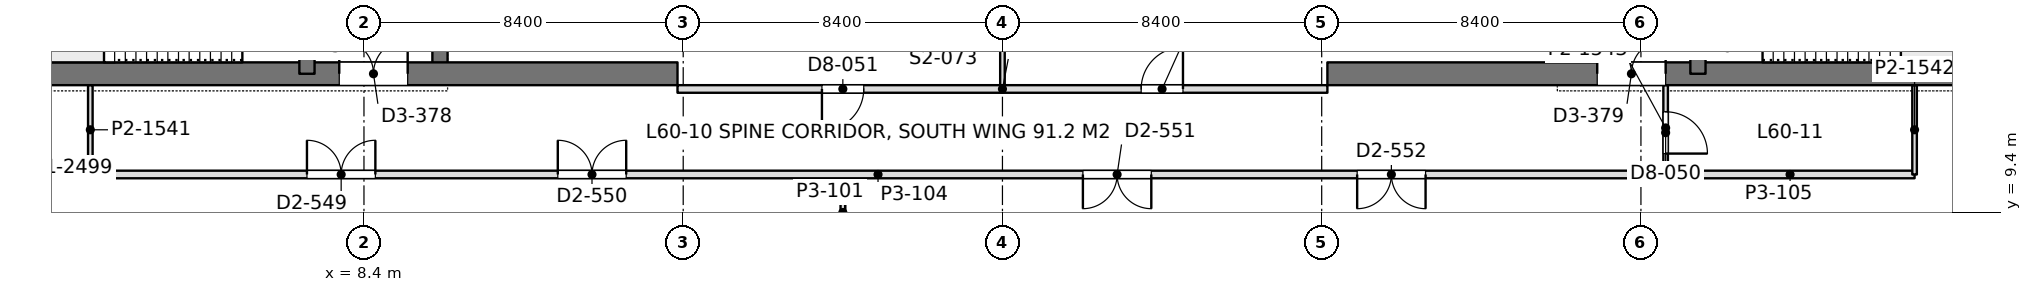
"""IFC4 building model, lengths in metres.
Left out: names, types, materials, properties, quantities, classifications, styles, units other than length and angle.
Written with IfcOpenShell. Run it as: python <this file> out.ifc"""

import sys

from ifc_helpers import new_model, si_unit, direction, frame, frame_2d, origin, place, context, subcontext, project, spatial, rectangle, extrude, element, fill, save


model = new_model("IFC4")
c1 = context("Model", 3, precision=1e-05, world=origin(), true_north=direction((0.0, 1.0)))
c2 = subcontext(c1, "Body", "Model", "MODEL_VIEW")
j1 = project(units=[si_unit("LENGTHUNIT", "METRE"), si_unit("PLANEANGLEUNIT", "RADIAN")], contexts=[c1])
p1 = place(None, origin())
s1 = spatial("IfcSite", under=j1, at=p1, CompositionType="ELEMENT")
p2 = place(p1, origin())
s2 = spatial("IfcBuilding", under=s1, at=p2, CompositionType="ELEMENT")
p3 = place(p2, frame((0.0, 0.0, 263.7)))
s3 = spatial("IfcBuildingStorey", under=s2, at=p3, CompositionType="ELEMENT", Elevation=263.7)
p4 = place(p3, frame((-1.05, 13.05, 0.0), z_axis=(0.0, 0.0, 1.0), x_axis=(1.0, 0.0, 0.0)))
e1 = element("IfcWall", 1, at=p4, inside=s3, PredefinedType="SHEAR", context=c2, shape_type="SweptSolid", body=[
    extrude(rectangle(XDim=17.7, YDim=0.6, at=frame_2d((8.85, 0.0))), origin(), (0.0, 0.0, 1.0), 4.5),
])
p5 = place(p4, frame((8.8, 0.0, 0.0)))
e2 = element("IfcOpeningElement", 2, at=p5, cuts=e1, PredefinedType="OPENING", context=c2, shape_type="SweptSolid", body=[
    extrude(rectangle(XDim=1.8, YDim=2.4, at=frame_2d((0.9, 1.2))), frame((0.0, 0.31, 0.0), z_axis=(0.0, -1.0, 0.0), x_axis=(1.0, 0.0, 0.0)), (0.0, 0.0, 1.0), 0.62),
])
p6 = place(p3, frame((6.9, 13.05, 0.0), z_axis=(0.0, 0.0, 1.0), x_axis=(0.0, 1.0, 0.0)))
e3 = element("IfcWall", 3, at=p6, inside=s3, PredefinedType="SHEAR", context=c2, shape_type="SweptSolid", body=[
    extrude(rectangle(XDim=24.3, YDim=0.4, at=frame_2d((12.15, 0.0))), origin(), (0.0, 0.0, 1.0), 4.5),
])
p7 = place(p6, frame((1.3, 0.0, 0.0)))
e4 = element("IfcOpeningElement", 4, at=p7, cuts=e3, PredefinedType="OPENING", context=c2, shape_type="SweptSolid", body=[
    extrude(rectangle(XDim=1.0, YDim=2.2, at=frame_2d((0.5, 1.1))), frame((0.0, 0.21, 0.0), z_axis=(0.0, -1.0, 0.0), x_axis=(1.0, 0.0, 0.0)), (0.0, 0.0, 1.0), 0.42),
])
p8 = place(p6, frame((22.0, 0.0, 0.0)))
e5 = element("IfcOpeningElement", 5, at=p8, cuts=e3, PredefinedType="OPENING", context=c2, shape_type="SweptSolid", body=[
    extrude(rectangle(XDim=1.0, YDim=2.2, at=frame_2d((0.5, 1.1))), frame((0.0, 0.21, 0.0), z_axis=(0.0, -1.0, 0.0), x_axis=(1.0, 0.0, 0.0)), (0.0, 0.0, 1.0), 0.42),
])
p9 = place(p6, frame((5.55, 0.0, 0.0)))
e6 = element("IfcOpeningElement", 6, at=p9, cuts=e3, PredefinedType="OPENING", context=c2, shape_type="SweptSolid", body=[
    extrude(rectangle(XDim=1.0, YDim=2.2, at=frame_2d((0.5, 1.1))), frame((0.0, 0.21, 0.0), z_axis=(0.0, -1.0, 0.0), x_axis=(1.0, 0.0, 0.0)), (0.0, 0.0, 1.0), 0.42),
])
p10 = place(p6, frame((9.55, 0.0, 0.0)))
e7 = element("IfcOpeningElement", 7, at=p10, cuts=e3, PredefinedType="OPENING", context=c2, shape_type="SweptSolid", body=[
    extrude(rectangle(XDim=1.0, YDim=2.2, at=frame_2d((0.5, 1.1))), frame((0.0, 0.21, 0.0), z_axis=(0.0, -1.0, 0.0), x_axis=(1.0, 0.0, 0.0)), (0.0, 0.0, 1.0), 0.42),
])
p11 = place(p6, frame((12.8, 0.0, 0.0)))
e8 = element("IfcOpeningElement", 8, at=p11, cuts=e3, PredefinedType="OPENING", context=c2, shape_type="SweptSolid", body=[
    extrude(rectangle(XDim=1.1, YDim=2.2, at=frame_2d((0.55, 1.1))), frame((0.0, 0.21, 0.0), z_axis=(0.0, -1.0, 0.0), x_axis=(1.0, 0.0, 0.0)), (0.0, 0.0, 1.0), 0.42),
])
p12 = place(p6, frame((15.538, 0.0, 0.0)))
e9 = element("IfcOpeningElement", 9, at=p12, cuts=e3, PredefinedType="OPENING", context=c2, shape_type="SweptSolid", body=[
    extrude(rectangle(XDim=1.1, YDim=2.2, at=frame_2d((0.55, 1.1))), frame((0.0, 0.21, 0.0), z_axis=(0.0, -1.0, 0.0), x_axis=(1.0, 0.0, 0.0)), (0.0, 0.0, 1.0), 0.42),
])
p13 = place(p6, frame((18.262, 0.0, 0.0)))
e10 = element("IfcOpeningElement", 10, at=p13, cuts=e3, PredefinedType="OPENING", context=c2, shape_type="SweptSolid", body=[
    extrude(rectangle(XDim=1.1, YDim=2.2, at=frame_2d((0.55, 1.1))), frame((0.0, 0.21, 0.0), z_axis=(0.0, -1.0, 0.0), x_axis=(1.0, 0.0, 0.0)), (0.0, 0.0, 1.0), 0.42),
])
p14 = place(p3, frame((10.4, 13.05, 0.0), z_axis=(0.0, 0.0, 1.0), x_axis=(0.0, 1.0, 0.0)))
e11 = element("IfcWall", 11, at=p14, inside=s3, PredefinedType="SHEAR", context=c2, shape_type="SweptSolid", body=[
    extrude(rectangle(XDim=24.3, YDim=0.4, at=frame_2d((12.15, 0.0))), origin(), (0.0, 0.0, 1.0), 4.5),
])
p15 = place(p14, frame((15.75, 0.0, 0.0)))
e12 = element("IfcOpeningElement", 12, at=p15, cuts=e11, PredefinedType="OPENING", context=c2, shape_type="SweptSolid", body=[
    extrude(rectangle(XDim=1.1, YDim=2.2, at=frame_2d((0.55, 1.1))), frame((0.0, 0.21, 0.0), z_axis=(0.0, -1.0, 0.0), x_axis=(1.0, 0.0, 0.0)), (0.0, 0.0, 1.0), 0.42),
])
p16 = place(p14, frame((18.6, 0.0, 0.0)))
e13 = element("IfcOpeningElement", 13, at=p16, cuts=e11, PredefinedType="OPENING", context=c2, shape_type="SweptSolid", body=[
    extrude(rectangle(XDim=1.1, YDim=2.2, at=frame_2d((0.55, 1.1))), frame((0.0, 0.21, 0.0), z_axis=(0.0, -1.0, 0.0), x_axis=(1.0, 0.0, 0.0)), (0.0, 0.0, 1.0), 0.42),
])
p17 = place(p14, frame((21.45, 0.0, 0.0)))
e14 = element("IfcOpeningElement", 14, at=p17, cuts=e11, PredefinedType="OPENING", context=c2, shape_type="SweptSolid", body=[
    extrude(rectangle(XDim=1.1, YDim=2.2, at=frame_2d((0.55, 1.1))), frame((0.0, 0.21, 0.0), z_axis=(0.0, -1.0, 0.0), x_axis=(1.0, 0.0, 0.0)), (0.0, 0.0, 1.0), 0.42),
])
p18 = place(p14, frame((6.05, 0.0, 0.0)))
e15 = element("IfcOpeningElement", 15, at=p18, cuts=e11, PredefinedType="OPENING", context=c2, shape_type="SweptSolid", body=[
    extrude(rectangle(XDim=1.8, YDim=2.4, at=frame_2d((0.9, 1.2))), frame((0.0, 0.21, 0.0), z_axis=(0.0, -1.0, 0.0), x_axis=(1.0, 0.0, 0.0)), (0.0, 0.0, 1.0), 0.42),
])
p19 = place(p14, frame((11.25, 0.0, 0.0)))
e16 = element("IfcOpeningElement", 16, at=p19, cuts=e11, PredefinedType="OPENING", context=c2, shape_type="SweptSolid", body=[
    extrude(rectangle(XDim=1.8, YDim=2.4, at=frame_2d((0.9, 1.2))), frame((0.0, 0.21, 0.0), z_axis=(0.0, -1.0, 0.0), x_axis=(1.0, 0.0, 0.0)), (0.0, 0.0, 1.0), 0.42),
])
p20 = place(p3, frame((33.75, 13.05, 0.0), z_axis=(0.0, 0.0, 1.0), x_axis=(1.0, 0.0, 0.0)))
e17 = element("IfcWall", 17, at=p20, inside=s3, PredefinedType="SHEAR", context=c2, shape_type="SweptSolid", body=[
    extrude(rectangle(XDim=17.7, YDim=0.6, at=frame_2d((8.85, 0.0))), origin(), (0.0, 0.0, 1.0), 4.5),
])
p21 = place(p20, frame((7.1, 0.0, 0.0)))
e18 = element("IfcOpeningElement", 18, at=p21, cuts=e17, PredefinedType="OPENING", context=c2, shape_type="SweptSolid", body=[
    extrude(rectangle(XDim=1.8, YDim=2.4, at=frame_2d((0.9, 1.2))), frame((0.0, 0.31, 0.0), z_axis=(0.0, -1.0, 0.0), x_axis=(1.0, 0.0, 0.0)), (0.0, 0.0, 1.0), 0.62),
])
p22 = place(p3, frame((43.5, 13.05, 0.0), z_axis=(0.0, 0.0, 1.0), x_axis=(0.0, 1.0, 0.0)))
e19 = element("IfcWall", 19, at=p22, inside=s3, PredefinedType="SHEAR", context=c2, shape_type="SweptSolid", body=[
    extrude(rectangle(XDim=24.3, YDim=0.4, at=frame_2d((12.15, 0.0))), origin(), (0.0, 0.0, 1.0), 4.5),
])
p23 = place(p22, frame((1.3, 0.0, 0.0)))
e20 = element("IfcOpeningElement", 20, at=p23, cuts=e19, PredefinedType="OPENING", context=c2, shape_type="SweptSolid", body=[
    extrude(rectangle(XDim=1.0, YDim=2.2, at=frame_2d((0.5, 1.1))), frame((0.0, 0.21, 0.0), z_axis=(0.0, -1.0, 0.0), x_axis=(1.0, 0.0, 0.0)), (0.0, 0.0, 1.0), 0.42),
])
p24 = place(p22, frame((22.0, 0.0, 0.0)))
e21 = element("IfcOpeningElement", 21, at=p24, cuts=e19, PredefinedType="OPENING", context=c2, shape_type="SweptSolid", body=[
    extrude(rectangle(XDim=1.0, YDim=2.2, at=frame_2d((0.5, 1.1))), frame((0.0, 0.21, 0.0), z_axis=(0.0, -1.0, 0.0), x_axis=(1.0, 0.0, 0.0)), (0.0, 0.0, 1.0), 0.42),
])
p25 = place(p22, frame((5.55, 0.0, 0.0)))
e22 = element("IfcOpeningElement", 22, at=p25, cuts=e19, PredefinedType="OPENING", context=c2, shape_type="SweptSolid", body=[
    extrude(rectangle(XDim=1.0, YDim=2.2, at=frame_2d((0.5, 1.1))), frame((0.0, 0.21, 0.0), z_axis=(0.0, -1.0, 0.0), x_axis=(1.0, 0.0, 0.0)), (0.0, 0.0, 1.0), 0.42),
])
p26 = place(p22, frame((9.55, 0.0, 0.0)))
e23 = element("IfcOpeningElement", 23, at=p26, cuts=e19, PredefinedType="OPENING", context=c2, shape_type="SweptSolid", body=[
    extrude(rectangle(XDim=1.0, YDim=2.2, at=frame_2d((0.5, 1.1))), frame((0.0, 0.21, 0.0), z_axis=(0.0, -1.0, 0.0), x_axis=(1.0, 0.0, 0.0)), (0.0, 0.0, 1.0), 0.42),
])
p27 = place(p22, frame((12.8, 0.0, 0.0)))
e24 = element("IfcOpeningElement", 24, at=p27, cuts=e19, PredefinedType="OPENING", context=c2, shape_type="SweptSolid", body=[
    extrude(rectangle(XDim=1.1, YDim=2.2, at=frame_2d((0.55, 1.1))), frame((0.0, 0.21, 0.0), z_axis=(0.0, -1.0, 0.0), x_axis=(1.0, 0.0, 0.0)), (0.0, 0.0, 1.0), 0.42),
])
p28 = place(p22, frame((15.538, 0.0, 0.0)))
e25 = element("IfcOpeningElement", 25, at=p28, cuts=e19, PredefinedType="OPENING", context=c2, shape_type="SweptSolid", body=[
    extrude(rectangle(XDim=1.1, YDim=2.2, at=frame_2d((0.55, 1.1))), frame((0.0, 0.21, 0.0), z_axis=(0.0, -1.0, 0.0), x_axis=(1.0, 0.0, 0.0)), (0.0, 0.0, 1.0), 0.42),
])
p29 = place(p22, frame((18.262, 0.0, 0.0)))
e26 = element("IfcOpeningElement", 26, at=p29, cuts=e19, PredefinedType="OPENING", context=c2, shape_type="SweptSolid", body=[
    extrude(rectangle(XDim=1.1, YDim=2.2, at=frame_2d((0.55, 1.1))), frame((0.0, 0.21, 0.0), z_axis=(0.0, -1.0, 0.0), x_axis=(1.0, 0.0, 0.0)), (0.0, 0.0, 1.0), 0.42),
])
p30 = place(p3, frame((40.0, 13.05, 0.0), z_axis=(0.0, 0.0, 1.0), x_axis=(0.0, 1.0, 0.0)))
e27 = element("IfcWall", 27, at=p30, inside=s3, PredefinedType="SHEAR", context=c2, shape_type="SweptSolid", body=[
    extrude(rectangle(XDim=24.3, YDim=0.4, at=frame_2d((12.15, 0.0))), origin(), (0.0, 0.0, 1.0), 4.5),
])
p31 = place(p30, frame((15.75, 0.0, 0.0)))
e28 = element("IfcOpeningElement", 28, at=p31, cuts=e27, PredefinedType="OPENING", context=c2, shape_type="SweptSolid", body=[
    extrude(rectangle(XDim=1.1, YDim=2.2, at=frame_2d((0.55, 1.1))), frame((0.0, 0.21, 0.0), z_axis=(0.0, -1.0, 0.0), x_axis=(1.0, 0.0, 0.0)), (0.0, 0.0, 1.0), 0.42),
])
p32 = place(p30, frame((18.6, 0.0, 0.0)))
e29 = element("IfcOpeningElement", 29, at=p32, cuts=e27, PredefinedType="OPENING", context=c2, shape_type="SweptSolid", body=[
    extrude(rectangle(XDim=1.1, YDim=2.2, at=frame_2d((0.55, 1.1))), frame((0.0, 0.21, 0.0), z_axis=(0.0, -1.0, 0.0), x_axis=(1.0, 0.0, 0.0)), (0.0, 0.0, 1.0), 0.42),
])
p33 = place(p30, frame((21.45, 0.0, 0.0)))
e30 = element("IfcOpeningElement", 30, at=p33, cuts=e27, PredefinedType="OPENING", context=c2, shape_type="SweptSolid", body=[
    extrude(rectangle(XDim=1.1, YDim=2.2, at=frame_2d((0.55, 1.1))), frame((0.0, 0.21, 0.0), z_axis=(0.0, -1.0, 0.0), x_axis=(1.0, 0.0, 0.0)), (0.0, 0.0, 1.0), 0.42),
])
p34 = place(p30, frame((6.05, 0.0, 0.0)))
e31 = element("IfcOpeningElement", 31, at=p34, cuts=e27, PredefinedType="OPENING", context=c2, shape_type="SweptSolid", body=[
    extrude(rectangle(XDim=1.8, YDim=2.4, at=frame_2d((0.9, 1.2))), frame((0.0, 0.21, 0.0), z_axis=(0.0, -1.0, 0.0), x_axis=(1.0, 0.0, 0.0)), (0.0, 0.0, 1.0), 0.42),
])
p35 = place(p30, frame((11.25, 0.0, 0.0)))
e32 = element("IfcOpeningElement", 32, at=p35, cuts=e27, PredefinedType="OPENING", context=c2, shape_type="SweptSolid", body=[
    extrude(rectangle(XDim=1.8, YDim=2.4, at=frame_2d((0.9, 1.2))), frame((0.0, 0.21, 0.0), z_axis=(0.0, -1.0, 0.0), x_axis=(1.0, 0.0, 0.0)), (0.0, 0.0, 1.0), 0.42),
])
p36 = place(p3, frame((21.0, 8.498, 0.0), z_axis=(0.0, 0.0, 1.0), x_axis=(0.0, 1.0, 0.0)))
e33 = element("IfcWall", 33, at=p36, inside=s3, PredefinedType="PARTITIONING", context=c2, shape_type="SweptSolid", body=[
    extrude(rectangle(XDim=1.804, YDim=0.12, at=frame_2d((0.902, 0.0))), origin(), (0.0, 0.0, 1.0), 3.8),
])
p37 = place(p3, frame((1.2, 10.4, 0.0), z_axis=(0.0, 0.0, 1.0), x_axis=(1.0, 0.0, 0.0)))
e34 = element("IfcWall", 34, at=p37, inside=s3, PredefinedType="PARTITIONING", context=c2, shape_type="SweptSolid", body=[
    extrude(rectangle(XDim=41.452, YDim=0.2, at=frame_2d((20.726, 0.0))), origin(), (0.0, 0.0, 1.0), 3.8),
])
p38 = place(p37, frame((5.7, 0.0, 0.0)))
e35 = element("IfcOpeningElement", 35, at=p38, cuts=e34, PredefinedType="OPENING", context=c2, shape_type="SweptSolid", body=[
    extrude(rectangle(XDim=1.8, YDim=2.2, at=frame_2d((0.9, 1.1))), frame((0.0, 0.11, 0.0), z_axis=(0.0, -1.0, 0.0), x_axis=(1.0, 0.0, 0.0)), (0.0, 0.0, 1.0), 0.22),
])
p39 = place(p37, frame((12.3, 0.0, 0.0)))
e36 = element("IfcOpeningElement", 36, at=p39, cuts=e34, PredefinedType="OPENING", context=c2, shape_type="SweptSolid", body=[
    extrude(rectangle(XDim=1.8, YDim=2.2, at=frame_2d((0.9, 1.1))), frame((0.0, 0.11, 0.0), z_axis=(0.0, -1.0, 0.0), x_axis=(1.0, 0.0, 0.0)), (0.0, 0.0, 1.0), 0.22),
])
p40 = place(p37, frame((26.117, 0.0, 0.0)))
e37 = element("IfcOpeningElement", 37, at=p40, cuts=e34, PredefinedType="OPENING", context=c2, shape_type="SweptSolid", body=[
    extrude(rectangle(XDim=1.8, YDim=2.2, at=frame_2d((0.9, 1.1))), frame((0.0, 0.11, 0.0), z_axis=(0.0, -1.0, 0.0), x_axis=(1.0, 0.0, 0.0)), (0.0, 0.0, 1.0), 0.22),
])
p41 = place(p37, frame((33.333, 0.0, 0.0)))
e38 = element("IfcOpeningElement", 38, at=p41, cuts=e34, PredefinedType="OPENING", context=c2, shape_type="SweptSolid", body=[
    extrude(rectangle(XDim=1.8, YDim=2.2, at=frame_2d((0.9, 1.1))), frame((0.0, 0.11, 0.0), z_axis=(0.0, -1.0, 0.0), x_axis=(1.0, 0.0, 0.0)), (0.0, 0.0, 1.0), 0.22),
])
p42 = place(p3, frame((1.2, 10.4, 0.0), z_axis=(0.0, 0.0, 1.0), x_axis=(0.0, 1.0, 0.0)))
e39 = element("IfcWall", 39, at=p42, inside=s3, PredefinedType="PARTITIONING", context=c2, shape_type="SweptSolid", body=[
    extrude(rectangle(XDim=2.352, YDim=0.12, at=frame_2d((1.176, 0.0))), origin(), (0.0, 0.0, 1.0), 4.35),
])
p43 = place(p3, frame((42.65, 10.498, 0.0), z_axis=(0.0, 0.0, 1.0), x_axis=(0.0, 1.0, 0.0)))
e40 = element("IfcWall", 40, at=p43, inside=s3, PredefinedType="PARTITIONING", context=c2, shape_type="SweptSolid", body=[
    extrude(rectangle(XDim=2.254, YDim=0.12, at=frame_2d((1.127, 0.0))), origin(), (0.0, 0.0, 1.0), 4.35),
])
p44 = place(p43, frame((0.452, 0.0, 0.0)))
e41 = element("IfcOpeningElement", 41, at=p44, cuts=e40, PredefinedType="OPENING", context=c2, shape_type="SweptSolid", body=[
    extrude(rectangle(XDim=1.1, YDim=2.4, at=frame_2d((0.55, 1.2))), frame((0.0, 0.07, 0.0), z_axis=(0.0, -1.0, 0.0), x_axis=(1.0, 0.0, 0.0)), (0.0, 0.0, 1.0), 0.14),
])
p45 = place(p3, frame((42.648, 10.4, 0.0), z_axis=(0.0, 0.0, 1.0), x_axis=(1.0, 0.0, 0.0)))
e42 = element("IfcWall", 42, at=p45, inside=s3, PredefinedType="PARTITIONING", context=c2, shape_type="SweptSolid", body=[
    extrude(rectangle(XDim=6.552, YDim=0.2, at=frame_2d((3.276, 0.0))), origin(), (0.0, 0.0, 1.0), 4.35),
])
p46 = place(p3, frame((49.2, 10.4, 0.0), z_axis=(0.0, 0.0, 1.0), x_axis=(0.0, 1.0, 0.0)))
e43 = element("IfcWall", 43, at=p46, inside=s3, PredefinedType="PARTITIONING", context=c2, shape_type="SweptSolid", body=[
    extrude(rectangle(XDim=2.352, YDim=0.12, at=frame_2d((1.176, 0.0))), origin(), (0.0, 0.0, 1.0), 4.35),
])
p47 = place(p3, frame((25.2, 12.698, 0.0), z_axis=(0.0, 0.0, 1.0), x_axis=(0.0, 1.0, 0.0)))
e44 = element("IfcWall", 44, at=p47, inside=s3, PredefinedType="PARTITIONING", context=c2, shape_type="SweptSolid", body=[
    extrude(rectangle(XDim=3.603, YDim=0.12, at=frame_2d((1.802, 0.0))), origin(), (0.0, 0.0, 1.0), 3.8),
])
p48 = place(p3, frame((16.65, 12.65, 0.0), z_axis=(0.0, 0.0, 1.0), x_axis=(1.0, 0.0, 0.0)))
e45 = element("IfcWall", 45, at=p48, inside=s3, PredefinedType="PARTITIONING", context=c2, shape_type="SweptSolid", body=[
    extrude(rectangle(XDim=17.1, YDim=0.2, at=frame_2d((8.55, 0.0))), origin(), (0.0, 0.0, 1.0), 3.8),
])
p49 = place(p48, frame((3.8, 0.0, 0.0)))
e46 = element("IfcOpeningElement", 46, at=p49, cuts=e45, PredefinedType="OPENING", context=c2, shape_type="SweptSolid", body=[
    extrude(rectangle(XDim=1.1, YDim=2.4, at=frame_2d((0.55, 1.2))), frame((0.0, 0.11, 0.0), z_axis=(0.0, -1.0, 0.0), x_axis=(1.0, 0.0, 0.0)), (0.0, 0.0, 1.0), 0.22),
])
p50 = place(p48, frame((12.2, 0.0, 0.0)))
e47 = element("IfcOpeningElement", 47, at=p50, cuts=e45, PredefinedType="OPENING", context=c2, shape_type="SweptSolid", body=[
    extrude(rectangle(XDim=1.1, YDim=2.4, at=frame_2d((0.55, 1.2))), frame((0.0, 0.11, 0.0), z_axis=(0.0, -1.0, 0.0), x_axis=(1.0, 0.0, 0.0)), (0.0, 0.0, 1.0), 0.22),
])
p51 = place(p5, origin())
e48 = element("IfcDoor", 48, at=p51, inside=s3, OperationType="DOUBLE_DOOR_SINGLE_SWING", PredefinedType="DOOR", context=c2, shape_type="SweptSolid", body=[
    extrude(rectangle(XDim=1.8, YDim=2.4, at=frame_2d((0.9, 1.2))), frame((0.0, 0.025, 0.0), z_axis=(0.0, -1.0, 0.0), x_axis=(1.0, 0.0, 0.0)), (0.0, 0.0, 1.0), 0.05),
])
fill(e2, e48)
p52 = place(p21, origin())
e49 = element("IfcDoor", 49, at=p52, inside=s3, OperationType="DOUBLE_DOOR_SINGLE_SWING", PredefinedType="DOOR", context=c2, shape_type="SweptSolid", body=[
    extrude(rectangle(XDim=1.8, YDim=2.4, at=frame_2d((0.9, 1.2))), frame((0.0, 0.025, 0.0), z_axis=(0.0, -1.0, 0.0), x_axis=(1.0, 0.0, 0.0)), (0.0, 0.0, 1.0), 0.05),
])
fill(e18, e49)
p53 = place(p38, origin())
e50 = element("IfcDoor", 50, at=p53, inside=s3, OperationType="DOUBLE_DOOR_SINGLE_SWING", PredefinedType="DOOR", context=c2, shape_type="SweptSolid", body=[
    extrude(rectangle(XDim=1.8, YDim=2.2, at=frame_2d((0.9, 1.1))), frame((0.0, 0.025, 0.0), z_axis=(0.0, -1.0, 0.0), x_axis=(1.0, 0.0, 0.0)), (0.0, 0.0, 1.0), 0.05),
])
fill(e35, e50)
p54 = place(p39, origin())
e51 = element("IfcDoor", 51, at=p54, inside=s3, OperationType="DOUBLE_DOOR_SINGLE_SWING", PredefinedType="DOOR", context=c2, shape_type="SweptSolid", body=[
    extrude(rectangle(XDim=1.8, YDim=2.2, at=frame_2d((0.9, 1.1))), frame((0.0, 0.025, 0.0), z_axis=(0.0, -1.0, 0.0), x_axis=(1.0, 0.0, 0.0)), (0.0, 0.0, 1.0), 0.05),
])
fill(e36, e51)
p55 = place(p40, frame((1.8, 0.0, 0.0), z_axis=(0.0, 0.0, 1.0), x_axis=(-1.0, 0.0, 0.0)))
e52 = element("IfcDoor", 52, at=p55, inside=s3, OperationType="DOUBLE_DOOR_SINGLE_SWING", PredefinedType="DOOR", context=c2, shape_type="SweptSolid", body=[
    extrude(rectangle(XDim=1.8, YDim=2.2, at=frame_2d((0.9, 1.1))), frame((0.0, 0.025, 0.0), z_axis=(0.0, -1.0, 0.0), x_axis=(1.0, 0.0, 0.0)), (0.0, 0.0, 1.0), 0.05),
])
fill(e37, e52)
p56 = place(p41, frame((1.8, 0.0, 0.0), z_axis=(0.0, 0.0, 1.0), x_axis=(-1.0, 0.0, 0.0)))
e53 = element("IfcDoor", 53, at=p56, inside=s3, OperationType="DOUBLE_DOOR_SINGLE_SWING", PredefinedType="DOOR", context=c2, shape_type="SweptSolid", body=[
    extrude(rectangle(XDim=1.8, YDim=2.2, at=frame_2d((0.9, 1.1))), frame((0.0, 0.025, 0.0), z_axis=(0.0, -1.0, 0.0), x_axis=(1.0, 0.0, 0.0)), (0.0, 0.0, 1.0), 0.05),
])
fill(e38, e53)
p57 = place(p44, frame((1.1, 0.0, 0.0), z_axis=(0.0, 0.0, 1.0), x_axis=(-1.0, 0.0, 0.0)))
e54 = element("IfcDoor", 54, at=p57, inside=s3, OperationType="SINGLE_SWING_RIGHT", PredefinedType="DOOR", context=c2, shape_type="SweptSolid", body=[
    extrude(rectangle(XDim=1.1, YDim=2.4, at=frame_2d((0.55, 1.2))), frame((0.0, 0.025, 0.0), z_axis=(0.0, -1.0, 0.0), x_axis=(1.0, 0.0, 0.0)), (0.0, 0.0, 1.0), 0.05),
])
fill(e41, e54)
p58 = place(p49, frame((1.1, 0.0, 0.0), z_axis=(0.0, 0.0, 1.0), x_axis=(-1.0, 0.0, 0.0)))
e55 = element("IfcDoor", 55, at=p58, inside=s3, OperationType="SINGLE_SWING_RIGHT", PredefinedType="DOOR", context=c2, shape_type="SweptSolid", body=[
    extrude(rectangle(XDim=1.1, YDim=2.4, at=frame_2d((0.55, 1.2))), frame((0.0, 0.025, 0.0), z_axis=(0.0, -1.0, 0.0), x_axis=(1.0, 0.0, 0.0)), (0.0, 0.0, 1.0), 0.05),
])
fill(e46, e55)
p59 = place(p50, origin())
e56 = element("IfcDoor", 56, at=p59, inside=s3, OperationType="SINGLE_SWING_RIGHT", PredefinedType="DOOR", context=c2, shape_type="SweptSolid", body=[
    extrude(rectangle(XDim=1.1, YDim=2.4, at=frame_2d((0.55, 1.2))), frame((0.0, 0.025, 0.0), z_axis=(0.0, -1.0, 0.0), x_axis=(1.0, 0.0, 0.0)), (0.0, 0.0, 1.0), 0.05),
])
fill(e47, e56)
save(model, sys.argv[1])
